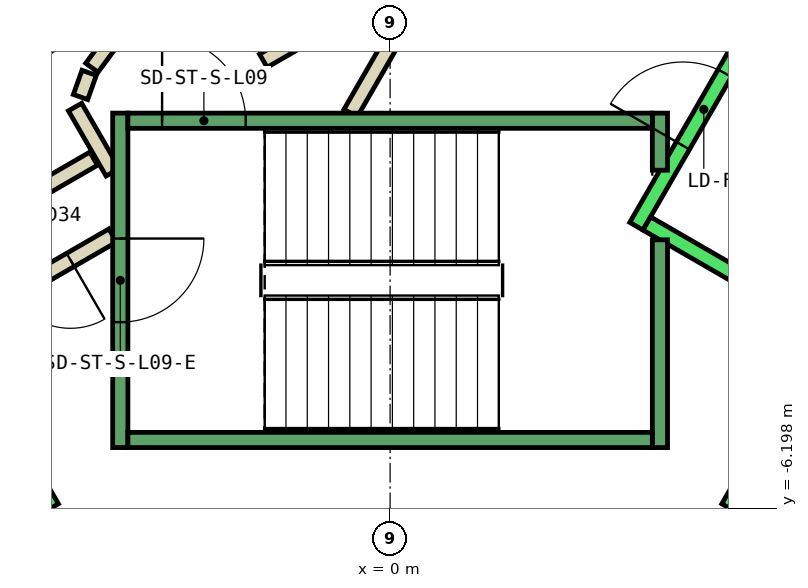
"""IFC4 building model, lengths in metres.
Left out: names, types, materials, properties, quantities, classifications, styles, units other than length and angle.
Written with IfcOpenShell. Run it as: python <this file> out.ifc"""

import sys

from ifc_helpers import new_model, si_unit, direction, frame, frame_2d, origin, place, context, subcontext, project, spatial, rectangle, extrude, element, fill, save


model = new_model("IFC4")
c1 = context("Model", 3, precision=1e-05, world=origin(), true_north=direction((0.0, 1.0)))
c2 = subcontext(c1, "Body", "Model", "MODEL_VIEW")
j1 = project(units=[si_unit("LENGTHUNIT", "METRE"), si_unit("PLANEANGLEUNIT", "RADIAN")], contexts=[c1])
p1 = place(None, origin())
s1 = spatial("IfcSite", under=j1, at=p1, CompositionType="ELEMENT")
p2 = place(p1, origin())
s2 = spatial("IfcBuilding", under=s1, at=p2, CompositionType="ELEMENT")
p3 = place(p2, frame((0.0, 0.0, 47.6)))
s3 = spatial("IfcBuildingStorey", under=s2, at=p3, CompositionType="ELEMENT", Elevation=47.6)
p4 = place(p3, frame((-3.9, -1.599, 0.0), z_axis=(0.0, 0.0, 1.0), x_axis=(-0.865969445389, -0.500096910261, 0.0)))
e1 = element("IfcWall", 1, at=p4, inside=s3, PredefinedType="PARTITIONING", context=c2, shape_type="SweptSolid", body=[
    extrude(rectangle(XDim=1.373, YDim=0.2, at=frame_2d((0.687, 0.0))), origin(), (0.0, 0.0, 1.0), 3.8),
])
p5 = place(p3, frame((-3.65, -2.61, 0.0), z_axis=(0.0, 0.0, 1.0), x_axis=(-0.866072462134, -0.499918483688, 0.0)))
e2 = element("IfcWall", 2, at=p5, inside=s3, PredefinedType="PARTITIONING", context=c2, shape_type="SweptSolid", body=[
    extrude(rectangle(XDim=2.084, YDim=0.2, at=frame_2d((1.042, 0.0))), origin(), (0.0, 0.0, 1.0), 3.8),
])
p6 = place(p5, frame((0.642, 0.0, 0.0)))
e3 = element("IfcOpeningElement", 3, at=p6, cuts=e2, PredefinedType="OPENING", context=c2, shape_type="SweptSolid", body=[
    extrude(rectangle(XDim=0.9, YDim=2.1, at=frame_2d((0.45, 1.05))), frame((0.0, 0.11, 0.0), z_axis=(0.0, -1.0, 0.0), x_axis=(1.0, 0.0, 0.0)), (0.0, 0.0, 1.0), 0.22),
])
p7 = place(p3, frame((-4.145, -0.92, 0.0), z_axis=(0.0, 0.0, 1.0), x_axis=(0.499743786207, -0.866173278362, 0.0)))
e4 = element("IfcWall", 4, at=p7, inside=s3, PredefinedType="PARTITIONING", context=c2, shape_type="SweptSolid", body=[
    extrude(rectangle(XDim=0.991, YDim=0.2, at=frame_2d((0.495, 0.0))), origin(), (0.0, 0.0, 1.0), 3.8),
])
p8 = place(p3, frame((-0.52, -1.0, 0.0), z_axis=(0.0, 0.0, 1.0), x_axis=(0.50011622646, 0.865958290007, 0.0)))
e5 = element("IfcWall", 5, at=p8, inside=s3, PredefinedType="PARTITIONING", context=c2, shape_type="SweptSolid", body=[
    extrude(rectangle(XDim=4.991, YDim=0.2, at=frame_2d((2.496, 0.0))), origin(), (0.0, 0.0, 1.0), 3.8),
])
p9 = place(p8, frame((1.945, 0.0, 0.0)))
e6 = element("IfcOpeningElement", 6, at=p9, cuts=e5, PredefinedType="OPENING", context=c2, shape_type="SweptSolid", body=[
    extrude(rectangle(XDim=1.0, YDim=2.1, at=frame_2d((0.5, 1.05))), frame((0.0, 0.11, 0.0), z_axis=(0.0, -1.0, 0.0), x_axis=(1.0, 0.0, 0.0)), (0.0, 0.0, 1.0), 0.22),
])
p10 = place(p3, frame((-0.412, 0.414, 0.0), z_axis=(0.0, 0.0, 1.0), x_axis=(-0.866017369001, -0.500013916395, 0.0)))
e7 = element("IfcWall", 7, at=p10, inside=s3, PredefinedType="PARTITIONING", context=c2, shape_type="SweptSolid", body=[
    extrude(rectangle(XDim=1.45, YDim=0.2, at=frame_2d((0.725, 0.0))), origin(), (0.0, 0.0, 1.0), 3.8),
])
p11 = place(p3, frame((-3.723, -0.131, 0.0), z_axis=(0.0, 0.0, 1.0), x_axis=(-0.594675113454, -0.803966112121, 0.0)))
e8 = element("IfcWall", 8, at=p11, inside=s3, PredefinedType="PARTITIONING", context=c2, shape_type="SweptSolid", body=[
    extrude(rectangle(XDim=0.338, YDim=0.2, at=frame_2d((0.169, 0.0))), origin(), (0.0, 0.0, 1.0), 3.8),
])
p12 = place(p3, frame((-3.96, -0.47, 0.0), z_axis=(0.0, 0.0, 1.0), x_axis=(-0.334824194261, -0.942280615813, 0.0)))
e9 = element("IfcWall", 9, at=p12, inside=s3, PredefinedType="PARTITIONING", context=c2, shape_type="SweptSolid", body=[
    extrude(rectangle(XDim=0.338, YDim=0.2, at=frame_2d((0.169, 0.0))), origin(), (0.0, 0.0, 1.0), 3.8),
])
p13 = place(p3, frame((-9.751, 2.99, 0.0), z_axis=(0.0, 0.0, 1.0), x_axis=(0.50000090737, -0.866024879913, 0.0)))
e10 = element("IfcWall", 10, at=p13, inside=s3, PredefinedType="STANDARD", context=c2, shape_type="SweptSolid", body=[
    extrude(rectangle(XDim=10.6, YDim=0.2, at=frame_2d((5.3, 0.0))), origin(), (0.0, 0.0, 1.0), 3.8),
])
p14 = place(p3, frame((3.24, -2.488, 0.0), z_axis=(0.0, 0.0, 1.0), x_axis=(0.49994636267, 0.866056369097, 0.0)))
e11 = element("IfcWall", 11, at=p14, inside=s3, PredefinedType="STANDARD", context=c2, shape_type="SweptSolid", body=[
    extrude(rectangle(XDim=2.8, YDim=0.2, at=frame_2d((1.4, 0.0))), origin(), (0.0, 0.0, 1.0), 3.8),
])
p15 = place(p14, frame((1.225, 0.0, 0.0)))
e12 = element("IfcOpeningElement", 12, at=p15, cuts=e11, PredefinedType="OPENING", context=c2, shape_type="SweptSolid", body=[
    extrude(rectangle(XDim=1.1, YDim=2.1, at=frame_2d((0.55, 1.05))), frame((0.0, 0.11, 0.0), z_axis=(0.0, -1.0, 0.0), x_axis=(1.0, 0.0, 0.0)), (0.0, 0.0, 1.0), 0.22),
])
p16 = place(p3, frame((3.377, -2.452, 0.0), z_axis=(0.0, 0.0, 1.0), x_axis=(0.865955154139, -0.50012165622, 0.0)))
e13 = element("IfcWall", 13, at=p16, inside=s3, PredefinedType="STANDARD", context=c2, shape_type="SweptSolid", body=[
    extrude(rectangle(XDim=2.4, YDim=0.2, at=frame_2d((1.2, 0.0))), origin(), (0.0, 0.0, 1.0), 3.8),
])
p17 = place(p3, frame((4.451, -6.19, 0.0), z_axis=(0.0, 0.0, 1.0), x_axis=(0.50000090737, 0.866024879913, 0.0)))
e14 = element("IfcWall", 14, at=p17, inside=s3, PredefinedType="STANDARD", context=c2, shape_type="SweptSolid", body=[
    extrude(rectangle(XDim=10.6, YDim=0.2, at=frame_2d((5.3, 0.0))), origin(), (0.0, 0.0, 1.0), 3.8),
])
p18 = place(p3, frame((-3.55, -1.0, 0.0), z_axis=(0.0, 0.0, 1.0), x_axis=(0.0, -1.0, 0.0)))
e15 = element("IfcWall", 15, at=p18, inside=s3, PredefinedType="STANDARD", context=c2, shape_type="SweptSolid", body=[
    extrude(rectangle(XDim=4.4, YDim=0.2, at=frame_2d((2.2, 0.0))), origin(), (0.0, 0.0, 1.0), 3.8),
])
p19 = place(p18, frame((1.65, 0.0, 0.0)))
e16 = element("IfcOpeningElement", 16, at=p19, cuts=e15, PredefinedType="OPENING", context=c2, shape_type="SweptSolid", body=[
    extrude(rectangle(XDim=1.1, YDim=2.2, at=frame_2d((0.55, 1.1))), frame((0.0, 0.11, 0.0), z_axis=(0.0, -1.0, 0.0), x_axis=(1.0, 0.0, 0.0)), (0.0, 0.0, 1.0), 0.22),
])
p20 = place(p3, frame((3.55, -2.667, 0.0), z_axis=(0.0, 0.0, 1.0), x_axis=(0.0, -1.0, 0.0)))
e17 = element("IfcWall", 17, at=p20, inside=s3, PredefinedType="STANDARD", context=c2, shape_type="SweptSolid", body=[
    extrude(rectangle(XDim=2.733, YDim=0.2, at=frame_2d((1.366, 0.0))), origin(), (0.0, 0.0, 1.0), 3.8),
])
p21 = place(p3, frame((3.55, -1.0, 0.0), z_axis=(0.0, 0.0, 1.0), x_axis=(0.0, -1.0, 0.0)))
e18 = element("IfcWall", 18, at=p21, inside=s3, PredefinedType="STANDARD", context=c2, shape_type="SweptSolid", body=[
    extrude(rectangle(XDim=0.751, YDim=0.2, at=frame_2d((0.375, 0.0))), origin(), (0.0, 0.0, 1.0), 3.8),
])
p22 = place(p3, frame((-3.45, -1.1, 0.0), z_axis=(0.0, 0.0, 1.0), x_axis=(1.0, 0.0, 0.0)))
e19 = element("IfcWall", 19, at=p22, inside=s3, PredefinedType="STANDARD", context=c2, shape_type="SweptSolid", body=[
    extrude(rectangle(XDim=6.9, YDim=0.2, at=frame_2d((3.45, 0.0))), origin(), (0.0, 0.0, 1.0), 3.8),
])
p23 = place(p22, frame((0.45, 0.0, 0.0)))
e20 = element("IfcOpeningElement", 20, at=p23, cuts=e19, PredefinedType="OPENING", context=c2, shape_type="SweptSolid", body=[
    extrude(rectangle(XDim=1.1, YDim=2.2, at=frame_2d((0.55, 1.1))), frame((0.0, 0.11, 0.0), z_axis=(0.0, -1.0, 0.0), x_axis=(1.0, 0.0, 0.0)), (0.0, 0.0, 1.0), 0.22),
])
p24 = place(p3, frame((-3.45, -5.3, 0.0), z_axis=(0.0, 0.0, 1.0), x_axis=(1.0, 0.0, 0.0)))
e21 = element("IfcWall", 21, at=p24, inside=s3, PredefinedType="STANDARD", context=c2, shape_type="SweptSolid", body=[
    extrude(rectangle(XDim=6.9, YDim=0.2, at=frame_2d((3.45, 0.0))), origin(), (0.0, 0.0, 1.0), 3.8),
])
p25 = place(p6, origin())
e22 = element("IfcDoor", 22, at=p25, inside=s3, OperationType="SINGLE_SWING_LEFT", PredefinedType="DOOR", context=c2, shape_type="SweptSolid", body=[
    extrude(rectangle(XDim=0.9, YDim=2.1, at=frame_2d((0.45, 1.05))), frame((0.0, 0.025, 0.0), z_axis=(0.0, -1.0, 0.0), x_axis=(1.0, 0.0, 0.0)), (0.0, 0.0, 1.0), 0.05),
])
fill(e3, e22)
p26 = place(p15, origin())
e23 = element("IfcDoor", 23, at=p26, inside=s3, OperationType="SLIDING_TO_LEFT", PredefinedType="DOOR", context=c2, shape_type="SweptSolid", body=[
    extrude(rectangle(XDim=1.1, YDim=2.1, at=frame_2d((0.55, 1.05))), frame((0.0, 0.025, 0.0), z_axis=(0.0, -1.0, 0.0), x_axis=(1.0, 0.0, 0.0)), (0.0, 0.0, 1.0), 0.05),
])
fill(e12, e23)
p27 = place(p23, origin())
e24 = element("IfcDoor", 24, at=p27, inside=s3, OperationType="SINGLE_SWING_LEFT", PredefinedType="DOOR", context=c2, shape_type="SweptSolid", body=[
    extrude(rectangle(XDim=1.1, YDim=2.2, at=frame_2d((0.55, 1.1))), frame((0.0, 0.025, 0.0), z_axis=(0.0, -1.0, 0.0), x_axis=(1.0, 0.0, 0.0)), (0.0, 0.0, 1.0), 0.05),
])
fill(e20, e24)
p28 = place(p19, origin())
e25 = element("IfcDoor", 25, at=p28, inside=s3, OperationType="SINGLE_SWING_LEFT", PredefinedType="DOOR", context=c2, shape_type="SweptSolid", body=[
    extrude(rectangle(XDim=1.1, YDim=2.2, at=frame_2d((0.55, 1.1))), frame((0.0, 0.025, 0.0), z_axis=(0.0, -1.0, 0.0), x_axis=(1.0, 0.0, 0.0)), (0.0, 0.0, 1.0), 0.05),
])
fill(e16, e25)
save(model, sys.argv[1])
